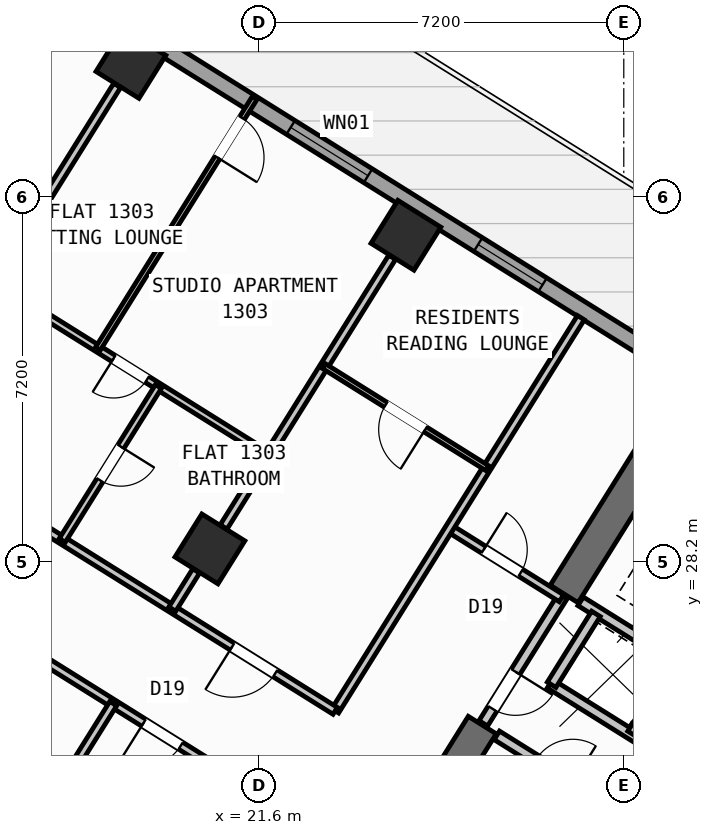
"""IFC4 building model, lengths in metres.
Left out: names, types, materials, properties, quantities, classifications, styles, units other than length and angle.
Written with IfcOpenShell. Run it as: python <this file> out.ifc"""

import sys

from ifc_helpers import new_model, si_unit, direction, frame, frame_2d, origin, origin_2d, place, context, subcontext, project, spatial, rectangle, hollow_rectangle, extrude, source, transform, mapped, element, fill, save


model = new_model("IFC4")
c1 = context("Model", 3, precision=1e-05, world=origin(), true_north=direction((0.0, 1.0)))
c2 = subcontext(c1, "Body", "Model", "MODEL_VIEW")
j1 = project(units=[si_unit("LENGTHUNIT", "METRE"), si_unit("PLANEANGLEUNIT", "RADIAN")], contexts=[c1])
p1 = place(None, origin())
s1 = spatial("IfcSite", under=j1, at=p1, CompositionType="ELEMENT")
p2 = place(p1, origin())
s2 = spatial("IfcBuilding", under=s1, at=p2, CompositionType="ELEMENT")
p3 = place(p2, frame((0.0, 0.0, 52.8)))
s3 = spatial("IfcBuildingStorey", under=s2, at=p3, CompositionType="ELEMENT", Elevation=52.8)
p4 = place(p3, frame((29.491, 30.552, 0.0), z_axis=(0.0, 0.0, 1.0), x_axis=(-0.529893103397, -0.8480644427, 0.0)))
e1 = element("IfcWall", 1, at=p4, inside=s3, PredefinedType="SHEAR", context=c2, shape_type="SweptSolid", body=[
    extrude(rectangle(XDim=3.525, YDim=0.65, at=frame_2d((1.763, 0.0))), origin(), (0.0, 0.0, 1.0), 3.35),
])
p5 = place(p3, frame((26.007, 24.976, 0.0), z_axis=(0.0, 0.0, 1.0), x_axis=(-0.529916319127, -0.848049936456, 0.0)))
e2 = element("IfcWall", 2, at=p5, inside=s3, PredefinedType="SHEAR", context=c2, shape_type="SweptSolid", body=[
    extrude(rectangle(XDim=6.375, YDim=0.65, at=frame_2d((3.188, 0.0))), origin(), (0.0, 0.0, 1.0), 3.35),
])
m1 = source(origin(), c2, "Body", "SweptSolid", [
    extrude(hollow_rectangle(XDim=1.0, YDim=1.0, WallThickness=0.04, at=origin_2d()), origin(), (0.0, 0.0, 1.0), 3.6),
])
for number, where, z_axis, x_axis in (
    (3, (24.5, 34.643, 0.0), (0.0, 0.0, 1.0), (-0.848, 0.53, 0.0)),
    (4, (20.632, 28.452, 0.0), (0.0, 0.0, 1.0), (-0.848, 0.53, 0.0)),
    (5, (19.073, 38.034, 0.0), (0.0, 0.0, 1.0), (-0.848, 0.53, 0.0)),
):
    element("IfcColumn", number, at=place(p3, frame(where, z_axis=z_axis, x_axis=x_axis)), inside=s3, PredefinedType="COLUMN", context=c2, shape_type="MappedRepresentation", body=[
        mapped(m1, transform((0.0, 0.0, 0.0), scale=1.0)),
    ])
p6 = place(p3, frame((14.138, 41.825, 0.0), z_axis=(0.0, 0.0, 1.0), x_axis=(0.848046498049, -0.529921821731, 0.0)))
e6 = element("IfcWall", 6, at=p6, inside=s3, PredefinedType="STANDARD", context=c2, shape_type="SweptSolid", body=[
    extrude(rectangle(XDim=31.588, YDim=0.32, at=frame_2d((15.794, 0.0))), origin(), (0.0, 0.0, 1.0), 3.35),
])
p7 = place(p6, frame((3.159, 0.0, 0.0)))
e7 = element("IfcOpeningElement", 7, at=p7, cuts=e6, PredefinedType="OPENING", context=c2, shape_type="SweptSolid", body=[
    extrude(rectangle(XDim=1.05, YDim=2.15, at=frame_2d((0.525, 1.075))), frame((0.0, 0.17, 0.0), z_axis=(0.0, -1.0, 0.0), x_axis=(1.0, 0.0, 0.0)), (0.0, 0.0, 1.0), 0.34),
])
p8 = place(p6, frame((0.906, 0.0, 1.0)))
e8 = element("IfcOpeningElement", 8, at=p8, cuts=e6, PredefinedType="OPENING", context=c2, shape_type="SweptSolid", body=[
    extrude(rectangle(XDim=0.9, YDim=1.25, at=frame_2d((0.45, 0.625))), frame((0.0, 0.17, 0.0), z_axis=(0.0, -1.0, 0.0), x_axis=(1.0, 0.0, 0.0)), (0.0, 0.0, 1.0), 0.34),
])
p9 = place(p6, frame((9.537, 0.0, 0.85)))
e9 = element("IfcOpeningElement", 9, at=p9, cuts=e6, PredefinedType="OPENING", context=c2, shape_type="SweptSolid", body=[
    extrude(rectangle(XDim=1.8, YDim=1.5, at=frame_2d((0.9, 0.75))), frame((0.0, 0.17, 0.0), z_axis=(0.0, -1.0, 0.0), x_axis=(1.0, 0.0, 0.0)), (0.0, 0.0, 1.0), 0.34),
])
p10 = place(p6, frame((13.899, 0.0, 0.85)))
e10 = element("IfcOpeningElement", 10, at=p10, cuts=e6, PredefinedType="OPENING", context=c2, shape_type="SweptSolid", body=[
    extrude(rectangle(XDim=1.5, YDim=1.5, at=frame_2d((0.75, 0.75))), frame((0.0, 0.17, 0.0), z_axis=(0.0, -1.0, 0.0), x_axis=(1.0, 0.0, 0.0)), (0.0, 0.0, 1.0), 0.34),
])
p11 = place(p6, frame((22.019, 0.0, 0.95)))
e11 = element("IfcOpeningElement", 11, at=p11, cuts=e6, PredefinedType="OPENING", context=c2, shape_type="SweptSolid", body=[
    extrude(rectangle(XDim=1.2, YDim=1.4, at=frame_2d((0.6, 0.7))), frame((0.0, 0.17, 0.0), z_axis=(0.0, -1.0, 0.0), x_axis=(1.0, 0.0, 0.0)), (0.0, 0.0, 1.0), 0.34),
])
p12 = place(p6, frame((27.569, 0.0, 0.95)))
e12 = element("IfcOpeningElement", 12, at=p12, cuts=e6, PredefinedType="OPENING", context=c2, shape_type="SweptSolid", body=[
    extrude(rectangle(XDim=1.2, YDim=1.4, at=frame_2d((0.6, 0.7))), frame((0.0, 0.17, 0.0), z_axis=(0.0, -1.0, 0.0), x_axis=(1.0, 0.0, 0.0)), (0.0, 0.0, 1.0), 0.34),
])
p13 = place(p3, frame((31.822, 24.998, 0.0), z_axis=(0.0, 0.0, 1.0), x_axis=(-0.848058348634, 0.529902856485, 0.0)))
e13 = element("IfcWall", 13, at=p13, inside=s3, PredefinedType="STANDARD", context=c2, shape_type="SweptSolid", body=[
    extrude(rectangle(XDim=4.568, YDim=0.2, at=frame_2d((2.284, 0.0))), origin(), (0.0, 0.0, 1.0), 3.34),
])
p14 = place(p3, frame((32.108, 22.814, 0.0), z_axis=(0.0, 0.0, 1.0), x_axis=(-0.848042229521, 0.529928652696, 0.0)))
e14 = element("IfcWall", 14, at=p14, inside=s3, PredefinedType="STANDARD", context=c2, shape_type="SweptSolid", body=[
    extrude(rectangle(XDim=5.62, YDim=0.2, at=frame_2d((2.81, 0.0))), origin(), (0.0, 0.0, 1.0), 3.34),
])
p15 = place(p3, frame((28.25, 27.17, 0.0), z_axis=(0.0, 0.0, 1.0), x_axis=(-0.529905827651, -0.848056492117, 0.0)))
e15 = element("IfcWall", 15, at=p15, inside=s3, PredefinedType="STANDARD", context=c2, shape_type="SweptSolid", body=[
    extrude(rectangle(XDim=1.65, YDim=0.2, at=frame_2d((0.825, 0.0))), origin(), (0.0, 0.0, 1.0), 3.34),
])
p16 = place(p3, frame((29.801, 26.142, 0.0), z_axis=(0.0, 0.0, 1.0), x_axis=(-0.529998940003, -0.847998304005, 0.0)))
e16 = element("IfcWall", 16, at=p16, inside=s3, PredefinedType="STANDARD", context=c2, shape_type="SweptSolid", body=[
    extrude(rectangle(XDim=1.58, YDim=0.2, at=frame_2d((0.79, 0.0))), origin(), (0.0, 0.0, 1.0), 3.34),
])
p17 = place(p3, frame((31.525, 21.504, 0.0), z_axis=(0.0, 0.0, 1.0), x_axis=(-0.848044998614, 0.529924221305, 0.0)))
e17 = element("IfcWall", 17, at=p17, inside=s3, PredefinedType="STANDARD", context=c2, shape_type="SweptSolid", body=[
    extrude(rectangle(XDim=6.168, YDim=0.2, at=frame_2d((3.084, 0.0))), origin(), (0.0, 0.0, 1.0), 3.34),
])
p18 = place(p17, frame((4.4, 0.0, 0.0)))
e18 = element("IfcOpeningElement", 18, at=p18, cuts=e17, PredefinedType="OPENING", context=c2, shape_type="SweptSolid", body=[
    extrude(rectangle(XDim=0.86, YDim=2.05, at=frame_2d((0.43, 1.025))), frame((0.0, 0.11, 0.0), z_axis=(0.0, -1.0, 0.0), x_axis=(1.0, 0.0, 0.0)), (0.0, 0.0, 1.0), 0.22),
])
p19 = place(p17, frame((0.35, 0.0, 0.0)))
e19 = element("IfcOpeningElement", 19, at=p19, cuts=e17, PredefinedType="OPENING", context=c2, shape_type="SweptSolid", body=[
    extrude(rectangle(XDim=0.86, YDim=2.05, at=frame_2d((0.43, 1.025))), frame((0.0, 0.11, 0.0), z_axis=(0.0, -1.0, 0.0), x_axis=(1.0, 0.0, 0.0)), (0.0, 0.0, 1.0), 0.22),
])
p20 = place(p3, frame((27.596, 27.52, 0.0), z_axis=(0.0, 0.0, 1.0), x_axis=(-0.529865479138, -0.848081702443, 0.0)))
e20 = element("IfcWall", 20, at=p20, inside=s3, PredefinedType="STANDARD", context=c2, shape_type="SweptSolid", body=[
    extrude(rectangle(XDim=2.96, YDim=0.2, at=frame_2d((1.48, 0.0))), origin(), (0.0, 0.0, 1.0), 3.34),
])
p21 = place(p20, frame((1.76, 0.0, 0.0)))
e21 = element("IfcOpeningElement", 21, at=p21, cuts=e20, PredefinedType="OPENING", context=c2, shape_type="SweptSolid", body=[
    extrude(rectangle(XDim=0.86, YDim=2.05, at=frame_2d((0.43, 1.025))), frame((0.0, 0.11, 0.0), z_axis=(0.0, -1.0, 0.0), x_axis=(1.0, 0.0, 0.0)), (0.0, 0.0, 1.0), 0.22),
])
p22 = place(p3, frame((27.57, 27.478, 0.0), z_axis=(0.0, 0.0, 1.0), x_axis=(-0.848050851465, 0.529914854792, 0.0)))
e22 = element("IfcWall", 22, at=p22, inside=s3, PredefinedType="PARTITIONING", context=c2, shape_type="SweptSolid", body=[
    extrude(rectangle(XDim=2.61, YDim=0.16, at=frame_2d((1.305, 0.0))), origin(), (0.0, 0.0, 1.0), 3.34),
])
p23 = place(p22, frame((0.95, 0.0, 0.0)))
e23 = element("IfcOpeningElement", 23, at=p23, cuts=e22, PredefinedType="OPENING", context=c2, shape_type="SweptSolid", body=[
    extrude(rectangle(XDim=0.86, YDim=2.05, at=frame_2d((0.43, 1.025))), frame((0.0, 0.09, 0.0), z_axis=(0.0, -1.0, 0.0), x_axis=(1.0, 0.0, 0.0)), (0.0, 0.0, 1.0), 0.18),
])
p24 = place(p3, frame((27.953, 33.016, 0.0), z_axis=(0.0, 0.0, 1.0), x_axis=(-0.529903001606, -0.848058257957, 0.0)))
e24 = element("IfcWall", 24, at=p24, inside=s3, PredefinedType="PARTITIONING", context=c2, shape_type="SweptSolid", body=[
    extrude(rectangle(XDim=9.15, YDim=0.16, at=frame_2d((4.575, 0.0))), origin(), (0.0, 0.0, 1.0), 3.34),
])
p25 = place(p3, frame((23.104, 25.256, 0.0), z_axis=(0.0, 0.0, 1.0), x_axis=(-0.848041752158, 0.529929416617, 0.0)))
e25 = element("IfcWall", 25, at=p25, inside=s3, PredefinedType="PARTITIONING", context=c2, shape_type="SweptSolid", body=[
    extrude(rectangle(XDim=16.73, YDim=0.16, at=frame_2d((8.365, 0.0))), origin(), (0.0, 0.0, 1.0), 3.34),
])
p26 = place(p25, frame((1.395, 0.0, 0.0)))
e26 = element("IfcOpeningElement", 26, at=p26, cuts=e25, PredefinedType="OPENING", context=c2, shape_type="SweptSolid", body=[
    extrude(rectangle(XDim=1.0, YDim=2.1, at=frame_2d((0.5, 1.05))), frame((0.0, 0.09, 0.0), z_axis=(0.0, -1.0, 0.0), x_axis=(1.0, 0.0, 0.0)), (0.0, 0.0, 1.0), 0.18),
])
p27 = place(p25, frame((7.82, 0.0, 0.0)))
e27 = element("IfcOpeningElement", 27, at=p27, cuts=e25, PredefinedType="OPENING", context=c2, shape_type="SweptSolid", body=[
    extrude(rectangle(XDim=1.0, YDim=2.1, at=frame_2d((0.5, 1.05))), frame((0.0, 0.09, 0.0), z_axis=(0.0, -1.0, 0.0), x_axis=(1.0, 0.0, 0.0)), (0.0, 0.0, 1.0), 0.18),
])
p28 = place(p25, frame((14.76, 0.0, 0.0)))
e28 = element("IfcOpeningElement", 28, at=p28, cuts=e25, PredefinedType="OPENING", context=c2, shape_type="SweptSolid", body=[
    extrude(rectangle(XDim=1.0, YDim=2.1, at=frame_2d((0.5, 1.05))), frame((0.0, 0.09, 0.0), z_axis=(0.0, -1.0, 0.0), x_axis=(1.0, 0.0, 0.0)), (0.0, 0.0, 1.0), 0.18),
])
p29 = place(p3, frame((21.938, 23.391, 0.0), z_axis=(0.0, 0.0, 1.0), x_axis=(-0.848045850158, 0.529922858565, 0.0)))
e29 = element("IfcWall", 29, at=p29, inside=s3, PredefinedType="PARTITIONING", context=c2, shape_type="SweptSolid", body=[
    extrude(rectangle(XDim=16.73, YDim=0.16, at=frame_2d((8.365, 0.0))), origin(), (0.0, 0.0, 1.0), 3.34),
])
p30 = place(p29, frame((2.22, 0.0, 0.0)))
e30 = element("IfcOpeningElement", 30, at=p30, cuts=e29, PredefinedType="OPENING", context=c2, shape_type="SweptSolid", body=[
    extrude(rectangle(XDim=0.86, YDim=2.05, at=frame_2d((0.43, 1.025))), frame((0.0, 0.09, 0.0), z_axis=(0.0, -1.0, 0.0), x_axis=(1.0, 0.0, 0.0)), (0.0, 0.0, 1.0), 0.18),
])
p31 = place(p29, frame((6.49, 0.0, 0.0)))
e31 = element("IfcOpeningElement", 31, at=p31, cuts=e29, PredefinedType="OPENING", context=c2, shape_type="SweptSolid", body=[
    extrude(rectangle(XDim=1.0, YDim=2.1, at=frame_2d((0.5, 1.05))), frame((0.0, 0.09, 0.0), z_axis=(0.0, -1.0, 0.0), x_axis=(1.0, 0.0, 0.0)), (0.0, 0.0, 1.0), 0.18),
])
p32 = place(p29, frame((11.14, 0.0, 0.0)))
e32 = element("IfcOpeningElement", 32, at=p32, cuts=e29, PredefinedType="OPENING", context=c2, shape_type="SweptSolid", body=[
    extrude(rectangle(XDim=1.0, YDim=2.1, at=frame_2d((0.5, 1.05))), frame((0.0, 0.09, 0.0), z_axis=(0.0, -1.0, 0.0), x_axis=(1.0, 0.0, 0.0)), (0.0, 0.0, 1.0), 0.18),
])
p33 = place(p3, frame((18.724, 25.399, 0.0), z_axis=(0.0, 0.0, 1.0), x_axis=(-0.529930102756, -0.848041323399, 0.0)))
e33 = element("IfcWall", 33, at=p33, inside=s3, PredefinedType="PARTITIONING", context=c2, shape_type="SweptSolid", body=[
    extrude(rectangle(XDim=3.188, YDim=0.16, at=frame_2d((1.594, 0.0))), origin(), (0.0, 0.0, 1.0), 2.725),
])
p34 = place(p3, frame((24.229, 34.209, 0.0), z_axis=(0.0, 0.0, 1.0), x_axis=(-0.529897533635, -0.848061674554, 0.0)))
e34 = element("IfcWall", 34, at=p34, inside=s3, PredefinedType="PARTITIONING", context=c2, shape_type="SweptSolid", body=[
    extrude(rectangle(XDim=6.276, YDim=0.16, at=frame_2d((3.138, 0.0))), origin(), (0.0, 0.0, 1.0), 2.725),
])
p35 = place(p3, frame((20.361, 28.018, 0.0), z_axis=(0.0, 0.0, 1.0), x_axis=(-0.529900064649, -0.848060093086, 0.0)))
e35 = element("IfcWall", 35, at=p35, inside=s3, PredefinedType="PARTITIONING", context=c2, shape_type="SweptSolid", body=[
    extrude(rectangle(XDim=0.888, YDim=0.16, at=frame_2d((0.444, 0.0))), origin(), (0.0, 0.0, 1.0), 2.725),
])
p36 = place(p3, frame((26.099, 30.05, 0.0), z_axis=(0.0, 0.0, 1.0), x_axis=(-0.84803087207, 0.529946827537, 0.0)))
e36 = element("IfcWall", 36, at=p36, inside=s3, PredefinedType="PARTITIONING", context=c2, shape_type="SweptSolid", body=[
    extrude(rectangle(XDim=3.79, YDim=0.11, at=frame_2d((1.895, 0.0))), origin(), (0.0, 0.0, 1.0), 3.34),
])
p37 = place(p36, frame((1.435, 0.0, 0.0)))
e37 = element("IfcOpeningElement", 37, at=p37, cuts=e36, PredefinedType="OPENING", context=c2, shape_type="SweptSolid", body=[
    extrude(rectangle(XDim=0.92, YDim=2.08, at=frame_2d((0.46, 1.04))), frame((0.0, 0.065, 0.0), z_axis=(0.0, -1.0, 0.0), x_axis=(1.0, 0.0, 0.0)), (0.0, 0.0, 1.0), 0.13),
])
p38 = place(p3, frame((18.802, 37.6, 0.0), z_axis=(0.0, 0.0, 1.0), x_axis=(-0.529915015264, -0.848050751193, 0.0)))
e38 = element("IfcWall", 38, at=p38, inside=s3, PredefinedType="PARTITIONING", context=c2, shape_type="SweptSolid", body=[
    extrude(rectangle(XDim=6.276, YDim=0.16, at=frame_2d((3.138, 0.0))), origin(), (0.0, 0.0, 1.0), 2.725),
])
p39 = place(p3, frame((21.787, 30.301, 0.0), z_axis=(0.0, 0.0, 1.0), x_axis=(-0.848049732085, 0.529916646191, 0.0)))
e39 = element("IfcWall", 39, at=p39, inside=s3, PredefinedType="PLUMBINGWALL", context=c2, shape_type="SweptSolid", body=[
    extrude(rectangle(XDim=6.4, YDim=0.14, at=frame_2d((3.2, 0.0))), origin(), (0.0, 0.0, 1.0), 3.34),
])
p40 = place(p39, frame((2.824, 0.0, 0.0)))
e40 = element("IfcOpeningElement", 40, at=p40, cuts=e39, PredefinedType="OPENING", context=c2, shape_type="SweptSolid", body=[
    extrude(rectangle(XDim=0.78, YDim=2.05, at=frame_2d((0.39, 1.025))), frame((0.0, 0.08, 0.0), z_axis=(0.0, -1.0, 0.0), x_axis=(1.0, 0.0, 0.0)), (0.0, 0.0, 1.0), 0.16),
])
p41 = place(p3, frame((19.616, 31.657, 0.0), z_axis=(0.0, 0.0, 1.0), x_axis=(-0.529876336437, -0.84807491891, 0.0)))
e41 = element("IfcWall", 41, at=p41, inside=s3, PredefinedType="PLUMBINGWALL", context=c2, shape_type="SweptSolid", body=[
    extrude(rectangle(XDim=3.58, YDim=0.14, at=frame_2d((1.79, 0.0))), origin(), (0.0, 0.0, 1.0), 3.34),
])
p42 = place(p41, frame((1.4, 0.0, 0.0)))
e42 = element("IfcOpeningElement", 42, at=p42, cuts=e41, PredefinedType="OPENING", context=c2, shape_type="SweptSolid", body=[
    extrude(rectangle(XDim=0.78, YDim=2.05, at=frame_2d((0.39, 1.025))), frame((0.0, 0.08, 0.0), z_axis=(0.0, -1.0, 0.0), x_axis=(1.0, 0.0, 0.0)), (0.0, 0.0, 1.0), 0.16),
])
p43 = place(p3, frame((21.517, 37.356, 0.0), z_axis=(0.0, 0.0, 1.0), x_axis=(-0.529916267533, -0.848049968695, 0.0)))
e43 = element("IfcWall", 43, at=p43, inside=s3, PredefinedType="PARTITIONING", context=c2, shape_type="SweptSolid", body=[
    extrude(rectangle(XDim=5.84, YDim=0.11, at=frame_2d((2.92, 0.0))), origin(), (0.0, 0.0, 1.0), 3.34),
])
p44 = place(p43, frame((0.47, 0.0, 0.0)))
e44 = element("IfcOpeningElement", 44, at=p44, cuts=e43, PredefinedType="OPENING", context=c2, shape_type="SweptSolid", body=[
    extrude(rectangle(XDim=0.92, YDim=2.08, at=frame_2d((0.46, 1.04))), frame((0.0, 0.065, 0.0), z_axis=(0.0, -1.0, 0.0), x_axis=(1.0, 0.0, 0.0)), (0.0, 0.0, 1.0), 0.13),
])
m2 = source(origin(), c2, "Body", "SweptSolid", [
    extrude(rectangle(XDim=1.8, YDim=1.5, at=frame_2d((0.9, 0.75))), frame((0.0, 0.03, 0.0), z_axis=(0.0, -1.0, 0.0), x_axis=(1.0, 0.0, 0.0)), (0.0, 0.0, 1.0), 0.06),
])
p45 = place(p9, origin())
e45 = element("IfcWindow", 45, at=p45, inside=s3, PartitioningType="SINGLE_PANEL", PredefinedType="WINDOW", context=c2, shape_type="MappedRepresentation", body=[
    mapped(m2, transform((0.0, 0.0, 0.0), scale=1.0)),
])
fill(e9, e45)
m3 = source(origin(), c2, "Body", "SweptSolid", [
    extrude(rectangle(XDim=1.5, YDim=1.5, at=frame_2d((0.75, 0.75))), frame((0.0, 0.03, 0.0), z_axis=(0.0, -1.0, 0.0), x_axis=(1.0, 0.0, 0.0)), (0.0, 0.0, 1.0), 0.06),
])
p46 = place(p10, origin())
e46 = element("IfcWindow", 46, at=p46, inside=s3, PartitioningType="SINGLE_PANEL", PredefinedType="WINDOW", context=c2, shape_type="MappedRepresentation", body=[
    mapped(m3, transform((0.0, 0.0, 0.0), scale=1.0)),
])
fill(e10, e46)
m4 = source(origin(), c2, "Body", "SweptSolid", [
    extrude(rectangle(XDim=0.86, YDim=2.05, at=frame_2d((0.43, 1.025))), frame((0.0, 0.025, 0.0), z_axis=(0.0, -1.0, 0.0), x_axis=(1.0, 0.0, 0.0)), (0.0, 0.0, 1.0), 0.05),
])
p47 = place(p23, frame((0.86, 0.0, 0.0), z_axis=(0.0, 0.0, 1.0), x_axis=(-1.0, 0.0, 0.0)))
e47 = element("IfcDoor", 47, at=p47, inside=s3, OperationType="SINGLE_SWING_LEFT", PredefinedType="DOOR", context=c2, shape_type="MappedRepresentation", body=[
    mapped(m4, transform((0.0, 0.0, 0.0), scale=1.0)),
])
fill(e23, e47)
p48 = place(p21, origin())
e48 = element("IfcDoor", 48, at=p48, inside=s3, OperationType="SINGLE_SWING_LEFT", PredefinedType="DOOR", context=c2, shape_type="MappedRepresentation", body=[
    mapped(m4, transform((0.0, 0.0, 0.0), scale=1.0)),
])
fill(e21, e48)
p49 = place(p30, origin())
e49 = element("IfcDoor", 49, at=p49, inside=s3, OperationType="SINGLE_SWING_RIGHT", PredefinedType="DOOR", context=c2, shape_type="MappedRepresentation", body=[
    mapped(m4, transform((0.0, 0.0, 0.0), scale=1.0)),
])
fill(e30, e49)
m5 = source(origin(), c2, "Body", "SweptSolid", [
    extrude(rectangle(XDim=1.0, YDim=2.1, at=frame_2d((0.5, 1.05))), frame((0.0, 0.025, 0.0), z_axis=(0.0, -1.0, 0.0), x_axis=(1.0, 0.0, 0.0)), (0.0, 0.0, 1.0), 0.05),
])
p50 = place(p26, origin())
e50 = element("IfcDoor", 50, at=p50, inside=s3, OperationType="SINGLE_SWING_RIGHT", PredefinedType="DOOR", context=c2, shape_type="MappedRepresentation", body=[
    mapped(m5, transform((0.0, 0.0, 0.0), scale=1.0)),
])
fill(e26, e50)
m6 = source(origin(), c2, "Body", "SweptSolid", [
    extrude(rectangle(XDim=0.92, YDim=2.08, at=frame_2d((0.46, 1.04))), frame((0.0, 0.025, 0.0), z_axis=(0.0, -1.0, 0.0), x_axis=(1.0, 0.0, 0.0)), (0.0, 0.0, 1.0), 0.05),
])
p51 = place(p37, origin())
e51 = element("IfcDoor", 51, at=p51, inside=s3, OperationType="SINGLE_SWING_LEFT", PredefinedType="DOOR", context=c2, shape_type="MappedRepresentation", body=[
    mapped(m6, transform((0.0, 0.0, 0.0), scale=1.0)),
])
fill(e37, e51)
p52 = place(p44, origin())
e52 = element("IfcDoor", 52, at=p52, inside=s3, OperationType="SINGLE_SWING_RIGHT", PredefinedType="DOOR", context=c2, shape_type="MappedRepresentation", body=[
    mapped(m6, transform((0.0, 0.0, 0.0), scale=1.0)),
])
fill(e44, e52)
m7 = source(origin(), c2, "Body", "SweptSolid", [
    extrude(rectangle(XDim=0.78, YDim=2.05, at=frame_2d((0.39, 1.025))), frame((0.0, 0.025, 0.0), z_axis=(0.0, -1.0, 0.0), x_axis=(1.0, 0.0, 0.0)), (0.0, 0.0, 1.0), 0.05),
])
p53 = place(p40, origin())
e53 = element("IfcDoor", 53, at=p53, inside=s3, OperationType="SINGLE_SWING_RIGHT", PredefinedType="DOOR", context=c2, shape_type="MappedRepresentation", body=[
    mapped(m7, transform((0.0, 0.0, 0.0), scale=1.0)),
])
fill(e40, e53)
p54 = place(p42, origin())
e54 = element("IfcDoor", 54, at=p54, inside=s3, OperationType="SINGLE_SWING_LEFT", PredefinedType="DOOR", context=c2, shape_type="MappedRepresentation", body=[
    mapped(m7, transform((0.0, 0.0, 0.0), scale=1.0)),
])
fill(e42, e54)
save(model, sys.argv[1])
